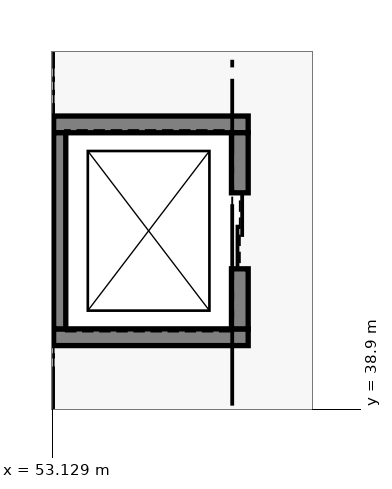
"""IFC4 building model, lengths in metres.
Left out: names, types, materials, properties, quantities, classifications, styles, units other than length and angle.
Written with IfcOpenShell. Run it as: python <this file> out.ifc"""

import sys

from ifc_helpers import new_model, si_unit, direction, frame, frame_2d, origin, place, context, subcontext, project, spatial, rectangle, extrude, element, fill, save


model = new_model("IFC4")
c1 = context("Model", 3, precision=1e-05, world=origin(), true_north=direction((0.0, 1.0)))
c2 = subcontext(c1, "Body", "Model", "MODEL_VIEW")
j1 = project(units=[si_unit("LENGTHUNIT", "METRE"), si_unit("PLANEANGLEUNIT", "RADIAN")], contexts=[c1])
p1 = place(None, origin())
s1 = spatial("IfcSite", under=j1, at=p1, CompositionType="ELEMENT")
p2 = place(p1, origin())
s2 = spatial("IfcBuilding", under=s1, at=p2, CompositionType="ELEMENT")
p3 = place(p2, frame((0.0, 0.0, 17.1)))
s3 = spatial("IfcBuildingStorey", under=s2, at=p3, CompositionType="ELEMENT", Elevation=17.1)
for number, where, z_axis, x_axis in (
    (1, (53.09, 39.85, 0.0), (0.0, 0.0, 1.0), (1.0, 0.0, 0.0)),
    (2, (53.09, 42.65, 0.0), (0.0, 0.0, 1.0), (1.0, 0.0, 0.0)),
):
    element("IfcWall", number, at=place(p3, frame(where, z_axis=z_axis, x_axis=x_axis)), inside=s3, PredefinedType="SOLIDWALL", context=c2, shape_type="SweptSolid", body=[
        extrude(rectangle(XDim=2.62, YDim=0.22, at=frame_2d((1.31, 0.0))), origin(), (0.0, 0.0, 1.0), 3.62),
    ])
p4 = place(p3, frame((53.2, 39.96, 0.0), z_axis=(0.0, 0.0, 1.0), x_axis=(0.0, 1.0, 0.0)))
e3 = element("IfcWall", 3, at=p4, inside=s3, PredefinedType="SOLIDWALL", context=c2, shape_type="SweptSolid", body=[
    extrude(rectangle(XDim=2.58, YDim=0.22, at=frame_2d((1.29, 0.0))), origin(), (0.0, 0.0, 1.0), 3.62),
])
p5 = place(p3, frame((55.6, 39.96, 0.0), z_axis=(0.0, 0.0, 1.0), x_axis=(0.0, 1.0, 0.0)))
e4 = element("IfcWall", 4, at=p5, inside=s3, PredefinedType="SOLIDWALL", context=c2, shape_type="SweptSolid", body=[
    extrude(rectangle(XDim=2.58, YDim=0.22, at=frame_2d((1.29, 0.0))), origin(), (0.0, 0.0, 1.0), 3.62),
])
p6 = place(p5, frame((0.79, 0.0, 0.0)))
e5 = element("IfcOpeningElement", 5, at=p6, cuts=e4, PredefinedType="OPENING", context=c2, shape_type="SweptSolid", body=[
    extrude(rectangle(XDim=1.0, YDim=2.15, at=frame_2d((0.5, 1.075))), frame((0.0, 0.12, 0.0), z_axis=(0.0, -1.0, 0.0), x_axis=(1.0, 0.0, 0.0)), (0.0, 0.0, 1.0), 0.24),
])
p7 = place(p6, origin())
e6 = element("IfcDoor", 6, at=p7, inside=s3, OperationType="SLIDING_TO_LEFT", PredefinedType="DOOR", context=c2, shape_type="SweptSolid", body=[
    extrude(rectangle(XDim=1.0, YDim=2.15, at=frame_2d((0.5, 1.075))), frame((0.0, 0.025, 0.0), z_axis=(0.0, -1.0, 0.0), x_axis=(1.0, 0.0, 0.0)), (0.0, 0.0, 1.0), 0.05),
])
fill(e5, e6)
save(model, sys.argv[1])
